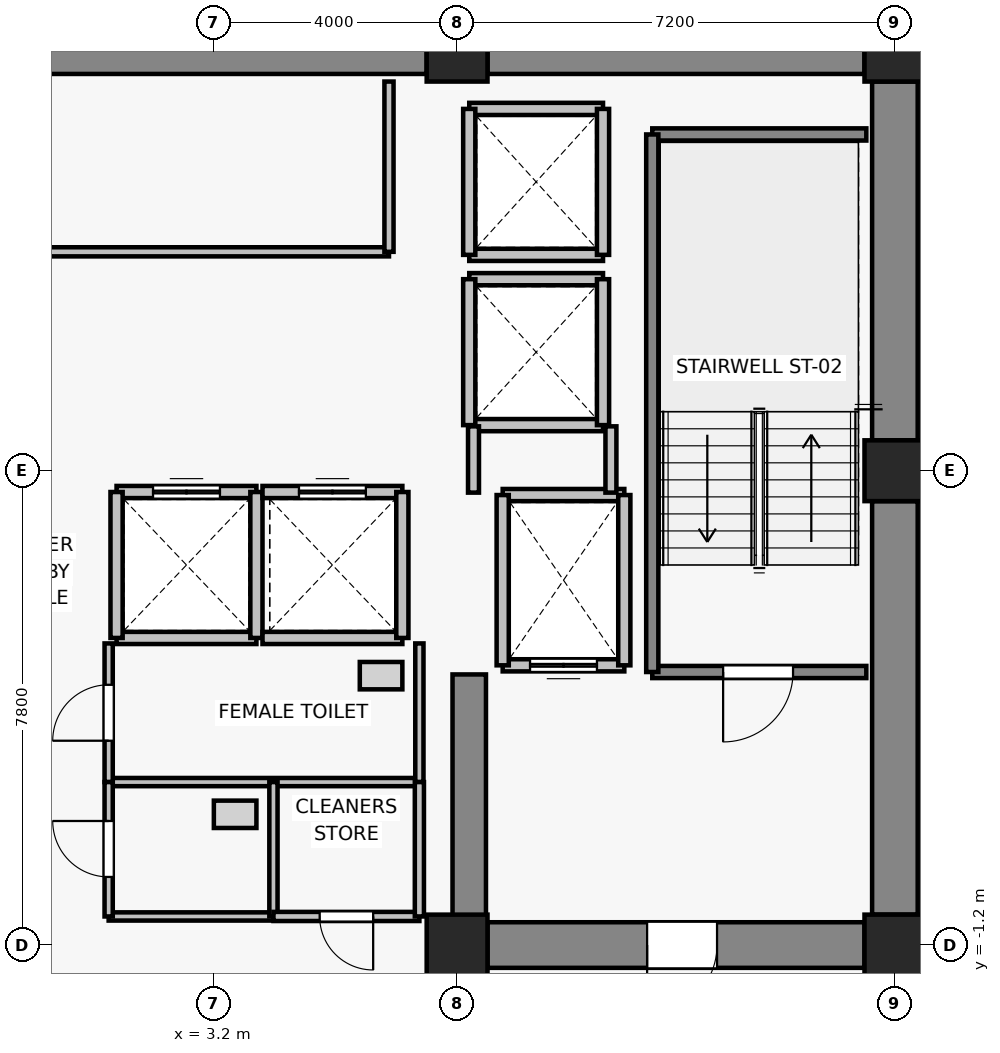
"""IFC4 building model, lengths in metres.
Left out: names, types, materials, properties, quantities, classifications, styles, units other than length and angle.
Written with IfcOpenShell. Run it as: python <this file> out.ifc"""

import sys

from ifc_helpers import new_model, si_unit, direction, frame, frame_2d, origin, origin_2d, place, context, subcontext, project, spatial, rectangle, extrude, source, transform, mapped, element, fill, save


model = new_model("IFC4")
c1 = context("Model", 3, precision=1e-05, world=origin(), true_north=direction((0.0, 1.0)))
c2 = subcontext(c1, "Body", "Model", "MODEL_VIEW")
j1 = project(units=[si_unit("LENGTHUNIT", "METRE"), si_unit("PLANEANGLEUNIT", "RADIAN")], contexts=[c1])
p1 = place(None, origin())
s1 = spatial("IfcSite", under=j1, at=p1, CompositionType="ELEMENT")
p2 = place(p1, origin())
s2 = spatial("IfcBuilding", under=s1, at=p2, CompositionType="ELEMENT")
p3 = place(p2, frame((0.0, 0.0, 90.1)))
s3 = spatial("IfcBuildingStorey", under=s2, at=p3, CompositionType="ELEMENT", Elevation=90.1)
for number, where, z_axis, x_axis in (
    (1, (7.2, -1.2, 0.0), (0.0, 0.0, 1.0), (1.0, 0.0, 0.0)),
    (2, (14.4, -1.2, 0.0), (0.0, 0.0, 1.0), (1.0, 0.0, 0.0)),
    (3, (14.4, 6.6, 0.0), (0.0, 0.0, 1.0), (1.0, 0.0, 0.0)),
    (4, (7.2, 13.5, 0.0), (0.0, 0.0, 1.0), (1.0, 0.0, 0.0)),
    (5, (14.4, 13.5, 0.0), (0.0, 0.0, 1.0), (1.0, 0.0, 0.0)),
):
    element("IfcColumn", number, at=place(p3, frame(where, z_axis=z_axis, x_axis=x_axis)), inside=s3, PredefinedType="COLUMN", context=c2, shape_type="SweptSolid", body=[
        extrude(rectangle(XDim=1.0, YDim=1.0, at=origin_2d()), origin(), (0.0, 0.0, 1.0), 3.3),
    ])
p4 = place(p3, frame((-6.7, 13.5, 0.0), z_axis=(0.0, 0.0, 1.0), x_axis=(1.0, 0.0, 0.0)))
e6 = element("IfcWall", 6, at=p4, inside=s3, PredefinedType="SHEAR", context=c2, shape_type="SweptSolid", body=[
    extrude(rectangle(XDim=13.4, YDim=0.75, at=frame_2d((6.7, 0.0))), origin(), (0.0, 0.0, 1.0), 3.075),
])
p5 = place(p3, frame((7.7, 13.5, 0.0), z_axis=(0.0, 0.0, 1.0), x_axis=(1.0, 0.0, 0.0)))
e7 = element("IfcWall", 7, at=p5, inside=s3, PredefinedType="SHEAR", context=c2, shape_type="SweptSolid", body=[
    extrude(rectangle(XDim=6.2, YDim=0.75, at=frame_2d((3.1, 0.0))), origin(), (0.0, 0.0, 1.0), 3.075),
])
p6 = place(p3, frame((14.4, -0.7, 0.0), z_axis=(0.0, 0.0, 1.0), x_axis=(0.0, 1.0, 0.0)))
e8 = element("IfcWall", 8, at=p6, inside=s3, PredefinedType="SHEAR", context=c2, shape_type="SweptSolid", body=[
    extrude(rectangle(XDim=6.8, YDim=0.75, at=frame_2d((3.4, 0.0))), origin(), (0.0, 0.0, 1.0), 3.075),
])
p7 = place(p3, frame((14.4, 7.1, 0.0), z_axis=(0.0, 0.0, 1.0), x_axis=(0.0, 1.0, 0.0)))
e9 = element("IfcWall", 9, at=p7, inside=s3, PredefinedType="SHEAR", context=c2, shape_type="SweptSolid", body=[
    extrude(rectangle(XDim=5.9, YDim=0.75, at=frame_2d((2.95, 0.0))), origin(), (0.0, 0.0, 1.0), 3.075),
])
p8 = place(p3, frame((13.9, -1.2, 0.0), z_axis=(0.0, 0.0, 1.0), x_axis=(-1.0, 0.0, 0.0)))
e10 = element("IfcWall", 10, at=p8, inside=s3, PredefinedType="SHEAR", context=c2, shape_type="SweptSolid", body=[
    extrude(rectangle(XDim=6.2, YDim=0.75, at=frame_2d((3.1, 0.0))), origin(), (0.0, 0.0, 1.0), 3.075),
])
p9 = place(p8, frame((2.425, 0.0, 0.0)))
e11 = element("IfcOpeningElement", 11, at=p9, cuts=e10, PredefinedType="OPENING", context=c2, shape_type="SweptSolid", body=[
    extrude(rectangle(XDim=1.15, YDim=2.15, at=frame_2d((0.575, 1.075))), frame((0.0, 0.385, 0.0), z_axis=(0.0, -1.0, 0.0), x_axis=(1.0, 0.0, 0.0)), (0.0, 0.0, 1.0), 0.77),
])
p10 = place(p3, frame((7.4, -0.825, 0.0), z_axis=(0.0, 0.0, 1.0), x_axis=(0.0, 1.0, 0.0)))
e12 = element("IfcWall", 12, at=p10, inside=s3, PredefinedType="SHEAR", context=c2, shape_type="SweptSolid", body=[
    extrude(rectangle(XDim=4.075, YDim=0.55, at=frame_2d((2.038, 0.0))), origin(), (0.0, 0.0, 1.0), 3.075),
])
p11 = place(p3, frame((9.95, 3.4, 0.0), z_axis=(0.0, 0.0, 1.0), x_axis=(-1.0, 0.0, 0.0)))
e13 = element("IfcWall", 13, at=p11, inside=s3, PredefinedType="SOLIDWALL", context=c2, shape_type="SweptSolid", body=[
    extrude(rectangle(XDim=2.0, YDim=0.2, at=frame_2d((1.0, 0.0))), origin(), (0.0, 0.0, 1.0), 3.075),
])
p12 = place(p11, frame((0.45, 0.0, 0.0)))
e14 = element("IfcOpeningElement", 14, at=p12, cuts=e13, PredefinedType="OPENING", context=c2, shape_type="SweptSolid", body=[
    extrude(rectangle(XDim=1.1, YDim=2.2, at=frame_2d((0.55, 1.1))), frame((0.0, 0.11, 0.0), z_axis=(0.0, -1.0, 0.0), x_axis=(1.0, 0.0, 0.0)), (0.0, 0.0, 1.0), 0.22),
])
p13 = place(p3, frame((7.95, 6.2, 0.0), z_axis=(0.0, 0.0, 1.0), x_axis=(1.0, 0.0, 0.0)))
e15 = element("IfcWall", 15, at=p13, inside=s3, PredefinedType="SOLIDWALL", context=c2, shape_type="SweptSolid", body=[
    extrude(rectangle(XDim=2.0, YDim=0.2, at=frame_2d((1.0, 0.0))), origin(), (0.0, 0.0, 1.0), 3.075),
])
for number, where, z_axis, x_axis in (
    (16, (7.95, 3.4, 0.0), (0.0, 0.0, 1.0), (0.0, 1.0, 0.0)),
    (17, (9.95, 6.2, 0.0), (0.0, 0.0, 1.0), (0.0, -1.0, 0.0)),
):
    element("IfcWall", number, at=place(p3, frame(where, z_axis=z_axis, x_axis=x_axis)), inside=s3, PredefinedType="SOLIDWALL", context=c2, shape_type="SweptSolid", body=[
        extrude(rectangle(XDim=2.8, YDim=0.2, at=frame_2d((1.4, 0.0))), origin(), (0.0, 0.0, 1.0), 3.075),
    ])
p14 = place(p3, frame((3.9, 3.85, 0.0), z_axis=(0.0, 0.0, 1.0), x_axis=(-1.0, 0.0, 0.0)))
e18 = element("IfcWall", 18, at=p14, inside=s3, PredefinedType="SOLIDWALL", context=c2, shape_type="SweptSolid", body=[
    extrude(rectangle(XDim=2.3, YDim=0.2, at=frame_2d((1.15, 0.0))), origin(), (0.0, 0.0, 1.0), 3.075),
])
p15 = place(p3, frame((1.6, 6.25, 0.0), z_axis=(0.0, 0.0, 1.0), x_axis=(1.0, 0.0, 0.0)))
e19 = element("IfcWall", 19, at=p15, inside=s3, PredefinedType="SOLIDWALL", context=c2, shape_type="SweptSolid", body=[
    extrude(rectangle(XDim=2.3, YDim=0.2, at=frame_2d((1.15, 0.0))), origin(), (0.0, 0.0, 1.0), 3.075),
])
p16 = place(p15, frame((0.6, 0.0, 0.0)))
e20 = element("IfcOpeningElement", 20, at=p16, cuts=e19, PredefinedType="OPENING", context=c2, shape_type="SweptSolid", body=[
    extrude(rectangle(XDim=1.1, YDim=2.2, at=frame_2d((0.55, 1.1))), frame((0.0, 0.11, 0.0), z_axis=(0.0, -1.0, 0.0), x_axis=(1.0, 0.0, 0.0)), (0.0, 0.0, 1.0), 0.22),
])
for number, where, z_axis, x_axis in (
    (21, (1.6, 3.85, 0.0), (0.0, 0.0, 1.0), (0.0, 1.0, 0.0)),
    (22, (3.9, 6.25, 0.0), (0.0, 0.0, 1.0), (0.0, -1.0, 0.0)),
):
    element("IfcWall", number, at=place(p3, frame(where, z_axis=z_axis, x_axis=x_axis)), inside=s3, PredefinedType="SOLIDWALL", context=c2, shape_type="SweptSolid", body=[
        extrude(rectangle(XDim=2.4, YDim=0.2, at=frame_2d((1.2, 0.0))), origin(), (0.0, 0.0, 1.0), 3.075),
    ])
p17 = place(p3, frame((6.3, 3.85, 0.0), z_axis=(0.0, 0.0, 1.0), x_axis=(-1.0, 0.0, 0.0)))
e23 = element("IfcWall", 23, at=p17, inside=s3, PredefinedType="SOLIDWALL", context=c2, shape_type="SweptSolid", body=[
    extrude(rectangle(XDim=2.3, YDim=0.2, at=frame_2d((1.15, 0.0))), origin(), (0.0, 0.0, 1.0), 3.075),
])
p18 = place(p3, frame((4.0, 6.25, 0.0), z_axis=(0.0, 0.0, 1.0), x_axis=(1.0, 0.0, 0.0)))
e24 = element("IfcWall", 24, at=p18, inside=s3, PredefinedType="SOLIDWALL", context=c2, shape_type="SweptSolid", body=[
    extrude(rectangle(XDim=2.3, YDim=0.2, at=frame_2d((1.15, 0.0))), origin(), (0.0, 0.0, 1.0), 3.075),
])
p19 = place(p18, frame((0.6, 0.0, 0.0)))
e25 = element("IfcOpeningElement", 25, at=p19, cuts=e24, PredefinedType="OPENING", context=c2, shape_type="SweptSolid", body=[
    extrude(rectangle(XDim=1.1, YDim=2.2, at=frame_2d((0.55, 1.1))), frame((0.0, 0.11, 0.0), z_axis=(0.0, -1.0, 0.0), x_axis=(1.0, 0.0, 0.0)), (0.0, 0.0, 1.0), 0.22),
])
p20 = place(p3, frame((6.3, 6.25, 0.0), z_axis=(0.0, 0.0, 1.0), x_axis=(0.0, -1.0, 0.0)))
e26 = element("IfcWall", 26, at=p20, inside=s3, PredefinedType="SOLIDWALL", context=c2, shape_type="SweptSolid", body=[
    extrude(rectangle(XDim=2.4, YDim=0.2, at=frame_2d((1.2, 0.0))), origin(), (0.0, 0.0, 1.0), 3.075),
])
for number, where, z_axis, x_axis in (
    (27, (9.6, 7.35, 0.0), (0.0, 0.0, 1.0), (-1.0, 0.0, 0.0)),
    (28, (7.4, 9.75, 0.0), (0.0, 0.0, 1.0), (1.0, 0.0, 0.0)),
):
    element("IfcWall", number, at=place(p3, frame(where, z_axis=z_axis, x_axis=x_axis)), inside=s3, PredefinedType="SOLIDWALL", context=c2, shape_type="SweptSolid", body=[
        extrude(rectangle(XDim=2.2, YDim=0.2, at=frame_2d((1.1, 0.0))), origin(), (0.0, 0.0, 1.0), 2.515),
    ])
p21 = place(p3, frame((7.4, 7.35, 0.0), z_axis=(0.0, 0.0, 1.0), x_axis=(0.0, 1.0, 0.0)))
e29 = element("IfcWall", 29, at=p21, inside=s3, PredefinedType="SOLIDWALL", context=c2, shape_type="SweptSolid", body=[
    extrude(rectangle(XDim=2.4, YDim=0.2, at=frame_2d((1.2, 0.0))), origin(), (0.0, 0.0, 1.0), 2.515),
])
p22 = place(p3, frame((9.6, 9.75, 0.0), z_axis=(0.0, 0.0, 1.0), x_axis=(0.0, -1.0, 0.0)))
e30 = element("IfcWall", 30, at=p22, inside=s3, PredefinedType="SOLIDWALL", context=c2, shape_type="SweptSolid", body=[
    extrude(rectangle(XDim=2.4, YDim=0.2, at=frame_2d((1.2, 0.0))), origin(), (0.0, 0.0, 1.0), 3.075),
])
for number, where, z_axis, x_axis in (
    (31, (9.6, 10.15, 0.0), (0.0, 0.0, 1.0), (-1.0, 0.0, 0.0)),
    (32, (7.4, 12.55, 0.0), (0.0, 0.0, 1.0), (1.0, 0.0, 0.0)),
):
    element("IfcWall", number, at=place(p3, frame(where, z_axis=z_axis, x_axis=x_axis)), inside=s3, PredefinedType="SOLIDWALL", context=c2, shape_type="SweptSolid", body=[
        extrude(rectangle(XDim=2.2, YDim=0.2, at=frame_2d((1.1, 0.0))), origin(), (0.0, 0.0, 1.0), 2.515),
    ])
p23 = place(p3, frame((7.4, 10.15, 0.0), z_axis=(0.0, 0.0, 1.0), x_axis=(0.0, 1.0, 0.0)))
e33 = element("IfcWall", 33, at=p23, inside=s3, PredefinedType="SOLIDWALL", context=c2, shape_type="SweptSolid", body=[
    extrude(rectangle(XDim=2.4, YDim=0.2, at=frame_2d((1.2, 0.0))), origin(), (0.0, 0.0, 1.0), 2.515),
])
p24 = place(p3, frame((9.6, 12.55, 0.0), z_axis=(0.0, 0.0, 1.0), x_axis=(0.0, -1.0, 0.0)))
e34 = element("IfcWall", 34, at=p24, inside=s3, PredefinedType="SOLIDWALL", context=c2, shape_type="SweptSolid", body=[
    extrude(rectangle(XDim=2.4, YDim=0.2, at=frame_2d((1.2, 0.0))), origin(), (0.0, 0.0, 1.0), 3.075),
])
p25 = place(p3, frame((13.93, 3.29, 0.0), z_axis=(0.0, 0.0, 1.0), x_axis=(-1.0, 0.0, 0.0)))
e35 = element("IfcWall", 35, at=p25, inside=s3, PredefinedType="SOLIDWALL", context=c2, shape_type="SweptSolid", body=[
    extrude(rectangle(XDim=3.52, YDim=0.2, at=frame_2d((1.76, 0.0))), origin(), (0.0, 0.0, 1.0), 3.075),
])
p26 = place(p25, frame((1.205, 0.0, 0.0)))
e36 = element("IfcOpeningElement", 36, at=p26, cuts=e35, PredefinedType="OPENING", context=c2, shape_type="SweptSolid", body=[
    extrude(rectangle(XDim=1.15, YDim=2.15, at=frame_2d((0.575, 1.075))), frame((0.0, 0.11, 0.0), z_axis=(0.0, -1.0, 0.0), x_axis=(1.0, 0.0, 0.0)), (0.0, 0.0, 1.0), 0.22),
])
p27 = place(p3, frame((10.41, 12.13, 0.0), z_axis=(0.0, 0.0, 1.0), x_axis=(1.0, 0.0, 0.0)))
e37 = element("IfcWall", 37, at=p27, inside=s3, PredefinedType="SOLIDWALL", context=c2, shape_type="SweptSolid", body=[
    extrude(rectangle(XDim=3.52, YDim=0.2, at=frame_2d((1.76, 0.0))), origin(), (0.0, 0.0, 1.0), 3.075),
])
p28 = place(p3, frame((10.41, 3.29, 0.0), z_axis=(0.0, 0.0, 1.0), x_axis=(0.0, 1.0, 0.0)))
e38 = element("IfcWall", 38, at=p28, inside=s3, PredefinedType="SOLIDWALL", context=c2, shape_type="SweptSolid", body=[
    extrude(rectangle(XDim=8.84, YDim=0.2, at=frame_2d((4.42, 0.0))), origin(), (0.0, 0.0, 1.0), 3.075),
])
p29 = place(p3, frame((7.47, 6.24, 0.0), z_axis=(0.0, 0.0, 1.0), x_axis=(0.0, 1.0, 0.0)))
e39 = element("IfcWall", 39, at=p29, inside=s3, PredefinedType="PARTITIONING", context=c2, shape_type="SweptSolid", body=[
    extrude(rectangle(XDim=1.09, YDim=0.18, at=frame_2d((0.545, 0.0))), origin(), (0.0, 0.0, 1.0), 2.515),
])
p30 = place(p3, frame((9.73, 7.33, 0.0), z_axis=(0.0, 0.0, 1.0), x_axis=(0.0, -1.0, 0.0)))
e40 = element("IfcWall", 40, at=p30, inside=s3, PredefinedType="PARTITIONING", context=c2, shape_type="SweptSolid", body=[
    extrude(rectangle(XDim=1.09, YDim=0.18, at=frame_2d((0.545, 0.0))), origin(), (0.0, 0.0, 1.0), 3.075),
])
p31 = place(p3, frame((6.08, 10.2, 0.0), z_axis=(0.0, 0.0, 1.0), x_axis=(-1.0, 0.0, 0.0)))
e41 = element("IfcWall", 41, at=p31, inside=s3, PredefinedType="PARTITIONING", context=c2, shape_type="SweptSolid", body=[
    extrude(rectangle(XDim=12.16, YDim=0.15, at=frame_2d((6.08, 0.0))), origin(), (0.0, 0.0, 1.0), 3.075),
])
p32 = place(p31, frame((7.005, 0.0, 0.0)))
e42 = element("IfcOpeningElement", 42, at=p32, cuts=e41, PredefinedType="OPENING", context=c2, shape_type="SweptSolid", body=[
    extrude(rectangle(XDim=1.15, YDim=2.15, at=frame_2d((0.575, 1.075))), frame((0.0, 0.085, 0.0), z_axis=(0.0, -1.0, 0.0), x_axis=(1.0, 0.0, 0.0)), (0.0, 0.0, 1.0), 0.17),
])
p33 = place(p3, frame((6.08, 13.0, 0.0), z_axis=(0.0, 0.0, 1.0), x_axis=(0.0, -1.0, 0.0)))
e43 = element("IfcWall", 43, at=p33, inside=s3, PredefinedType="PARTITIONING", context=c2, shape_type="SweptSolid", body=[
    extrude(rectangle(XDim=2.8, YDim=0.15, at=frame_2d((1.4, 0.0))), origin(), (0.0, 0.0, 1.0), 3.075),
])
p34 = place(p3, frame((6.58, 1.48, 0.0), z_axis=(0.0, 0.0, 1.0), x_axis=(-1.0, 0.0, 0.0)))
e44 = element("IfcWall", 44, at=p34, inside=s3, PredefinedType="PARTITIONING", context=c2, shape_type="SweptSolid", body=[
    extrude(rectangle(XDim=5.11, YDim=0.135, at=frame_2d((2.555, 0.0))), origin(), (0.0, 0.0, 1.0), 3.075),
])
p35 = place(p3, frame((1.47, 1.48, 0.0), z_axis=(0.0, 0.0, 1.0), x_axis=(0.0, 1.0, 0.0)))
e45 = element("IfcWall", 45, at=p35, inside=s3, PredefinedType="PARTITIONING", context=c2, shape_type="SweptSolid", body=[
    extrude(rectangle(XDim=2.28, YDim=0.135, at=frame_2d((1.14, 0.0))), origin(), (0.0, 0.0, 1.0), 3.075),
])
p36 = place(p35, frame((0.68, 0.0, 0.0)))
e46 = element("IfcOpeningElement", 46, at=p36, cuts=e45, PredefinedType="OPENING", context=c2, shape_type="SweptSolid", body=[
    extrude(rectangle(XDim=0.92, YDim=2.1, at=frame_2d((0.46, 1.05))), frame((0.0, 0.077, 0.0), z_axis=(0.0, -1.0, 0.0), x_axis=(1.0, 0.0, 0.0)), (0.0, 0.0, 1.0), 0.155),
])
p37 = place(p3, frame((6.58, 3.76, 0.0), z_axis=(0.0, 0.0, 1.0), x_axis=(0.0, -1.0, 0.0)))
e47 = element("IfcWall", 47, at=p37, inside=s3, PredefinedType="PARTITIONING", context=c2, shape_type="SweptSolid", body=[
    extrude(rectangle(XDim=2.28, YDim=0.135, at=frame_2d((1.14, 0.0))), origin(), (0.0, 0.0, 1.0), 3.075),
])
p38 = place(p3, frame((4.18, -0.73, 0.0), z_axis=(0.0, 0.0, 1.0), x_axis=(-1.0, 0.0, 0.0)))
e48 = element("IfcWall", 48, at=p38, inside=s3, PredefinedType="PARTITIONING", context=c2, shape_type="SweptSolid", body=[
    extrude(rectangle(XDim=2.71, YDim=0.135, at=frame_2d((1.355, 0.0))), origin(), (0.0, 0.0, 1.0), 3.075),
])
p39 = place(p3, frame((1.47, -0.73, 0.0), z_axis=(0.0, 0.0, 1.0), x_axis=(0.0, 1.0, 0.0)))
e49 = element("IfcWall", 49, at=p39, inside=s3, PredefinedType="PARTITIONING", context=c2, shape_type="SweptSolid", body=[
    extrude(rectangle(XDim=2.21, YDim=0.135, at=frame_2d((1.105, 0.0))), origin(), (0.0, 0.0, 1.0), 3.075),
])
p40 = place(p39, frame((0.65, 0.0, 0.0)))
e50 = element("IfcOpeningElement", 50, at=p40, cuts=e49, PredefinedType="OPENING", context=c2, shape_type="SweptSolid", body=[
    extrude(rectangle(XDim=0.92, YDim=2.1, at=frame_2d((0.46, 1.05))), frame((0.0, 0.077, 0.0), z_axis=(0.0, -1.0, 0.0), x_axis=(1.0, 0.0, 0.0)), (0.0, 0.0, 1.0), 0.155),
])
p41 = place(p3, frame((4.18, 1.48, 0.0), z_axis=(0.0, 0.0, 1.0), x_axis=(0.0, -1.0, 0.0)))
e51 = element("IfcWall", 51, at=p41, inside=s3, PredefinedType="PARTITIONING", context=c2, shape_type="SweptSolid", body=[
    extrude(rectangle(XDim=2.21, YDim=0.135, at=frame_2d((1.105, 0.0))), origin(), (0.0, 0.0, 1.0), 3.075),
])
p42 = place(p3, frame((6.58, -0.73, 0.0), z_axis=(0.0, 0.0, 1.0), x_axis=(-1.0, 0.0, 0.0)))
e52 = element("IfcWall", 52, at=p42, inside=s3, PredefinedType="PARTITIONING", context=c2, shape_type="SweptSolid", body=[
    extrude(rectangle(XDim=2.4, YDim=0.15, at=frame_2d((1.2, 0.0))), origin(), (0.0, 0.0, 1.0), 3.075),
])
p43 = place(p42, frame((0.76, 0.0, 0.0)))
e53 = element("IfcOpeningElement", 53, at=p43, cuts=e52, PredefinedType="OPENING", context=c2, shape_type="SweptSolid", body=[
    extrude(rectangle(XDim=0.88, YDim=2.1, at=frame_2d((0.44, 1.05))), frame((0.0, 0.085, 0.0), z_axis=(0.0, -1.0, 0.0), x_axis=(1.0, 0.0, 0.0)), (0.0, 0.0, 1.0), 0.17),
])
p44 = place(p3, frame((6.58, 1.48, 0.0), z_axis=(0.0, 0.0, 1.0), x_axis=(0.0, -1.0, 0.0)))
e54 = element("IfcWall", 54, at=p44, inside=s3, PredefinedType="PARTITIONING", context=c2, shape_type="SweptSolid", body=[
    extrude(rectangle(XDim=2.21, YDim=0.15, at=frame_2d((1.105, 0.0))), origin(), (0.0, 0.0, 1.0), 3.075),
])
m1 = source(origin(), c2, "Body", "SweptSolid", [
    extrude(rectangle(XDim=1.1, YDim=2.2, at=frame_2d((0.55, 1.1))), frame((0.0, 0.025, 0.0), z_axis=(0.0, -1.0, 0.0), x_axis=(1.0, 0.0, 0.0)), (0.0, 0.0, 1.0), 0.05),
])
p45 = place(p12, origin())
e55 = element("IfcDoor", 55, at=p45, inside=s3, OperationType="DOUBLE_DOOR_SLIDING", PredefinedType="DOOR", context=c2, shape_type="MappedRepresentation", body=[
    mapped(m1, transform((0.0, 0.0, 0.0), x_axis=(1.0, 0.0, 0.0), y_axis=(0.0, 1.0, 0.0), z_axis=(0.0, 0.0, 1.0), scale=1.0)),
])
fill(e14, e55)
p46 = place(p16, origin())
e56 = element("IfcDoor", 56, at=p46, inside=s3, OperationType="DOUBLE_DOOR_SLIDING", PredefinedType="DOOR", context=c2, shape_type="MappedRepresentation", body=[
    mapped(m1, transform((0.0, 0.0, 0.0), x_axis=(1.0, 0.0, 0.0), y_axis=(0.0, 1.0, 0.0), z_axis=(0.0, 0.0, 1.0), scale=1.0)),
])
fill(e20, e56)
p47 = place(p19, origin())
e57 = element("IfcDoor", 57, at=p47, inside=s3, OperationType="DOUBLE_DOOR_SLIDING", PredefinedType="DOOR", context=c2, shape_type="MappedRepresentation", body=[
    mapped(m1, transform((0.0, 0.0, 0.0), x_axis=(1.0, 0.0, 0.0), y_axis=(0.0, 1.0, 0.0), z_axis=(0.0, 0.0, 1.0), scale=1.0)),
])
fill(e25, e57)
m2 = source(origin(), c2, "Body", "SweptSolid", [
    extrude(rectangle(XDim=1.15, YDim=2.15, at=frame_2d((0.575, 1.075))), frame((0.0, 0.025, 0.0), z_axis=(0.0, -1.0, 0.0), x_axis=(1.0, 0.0, 0.0)), (0.0, 0.0, 1.0), 0.05),
])
p48 = place(p26, origin())
e58 = element("IfcDoor", 58, at=p48, inside=s3, OperationType="SINGLE_SWING_RIGHT", PredefinedType="DOOR", context=c2, shape_type="MappedRepresentation", body=[
    mapped(m2, transform((0.0, 0.0, 0.0), x_axis=(1.0, 0.0, 0.0), y_axis=(0.0, 1.0, 0.0), z_axis=(0.0, 0.0, 1.0), scale=1.0)),
])
fill(e36, e58)
p49 = place(p9, origin())
e59 = element("IfcDoor", 59, at=p49, inside=s3, OperationType="SINGLE_SWING_RIGHT", PredefinedType="DOOR", context=c2, shape_type="MappedRepresentation", body=[
    mapped(m2, transform((0.0, 0.0, 0.0), x_axis=(1.0, 0.0, 0.0), y_axis=(0.0, 1.0, 0.0), z_axis=(0.0, 0.0, 1.0), scale=1.0)),
])
fill(e11, e59)
m3 = source(origin(), c2, "Body", "SweptSolid", [
    extrude(rectangle(XDim=0.92, YDim=2.1, at=frame_2d((0.46, 1.05))), frame((0.0, 0.025, 0.0), z_axis=(0.0, -1.0, 0.0), x_axis=(1.0, 0.0, 0.0)), (0.0, 0.0, 1.0), 0.05),
])
p50 = place(p36, origin())
e60 = element("IfcDoor", 60, at=p50, inside=s3, OperationType="SINGLE_SWING_LEFT", PredefinedType="DOOR", context=c2, shape_type="MappedRepresentation", body=[
    mapped(m3, transform((0.0, 0.0, 0.0), x_axis=(1.0, 0.0, 0.0), y_axis=(0.0, 1.0, 0.0), z_axis=(0.0, 0.0, 1.0), scale=1.0)),
])
fill(e46, e60)
p51 = place(p40, origin())
e61 = element("IfcDoor", 61, at=p51, inside=s3, OperationType="SINGLE_SWING_RIGHT", PredefinedType="DOOR", context=c2, shape_type="MappedRepresentation", body=[
    mapped(m3, transform((0.0, 0.0, 0.0), x_axis=(1.0, 0.0, 0.0), y_axis=(0.0, 1.0, 0.0), z_axis=(0.0, 0.0, 1.0), scale=1.0)),
])
fill(e50, e61)
m4 = source(origin(), c2, "Body", "SweptSolid", [
    extrude(rectangle(XDim=0.88, YDim=2.1, at=frame_2d((0.44, 1.05))), frame((0.0, 0.025, 0.0), z_axis=(0.0, -1.0, 0.0), x_axis=(1.0, 0.0, 0.0)), (0.0, 0.0, 1.0), 0.05),
])
p52 = place(p43, origin())
e62 = element("IfcDoor", 62, at=p52, inside=s3, OperationType="SINGLE_SWING_LEFT", PredefinedType="DOOR", context=c2, shape_type="MappedRepresentation", body=[
    mapped(m4, transform((0.0, 0.0, 0.0), x_axis=(1.0, 0.0, 0.0), y_axis=(0.0, 1.0, 0.0), z_axis=(0.0, 0.0, 1.0), scale=1.0)),
])
fill(e53, e62)
save(model, sys.argv[1])
